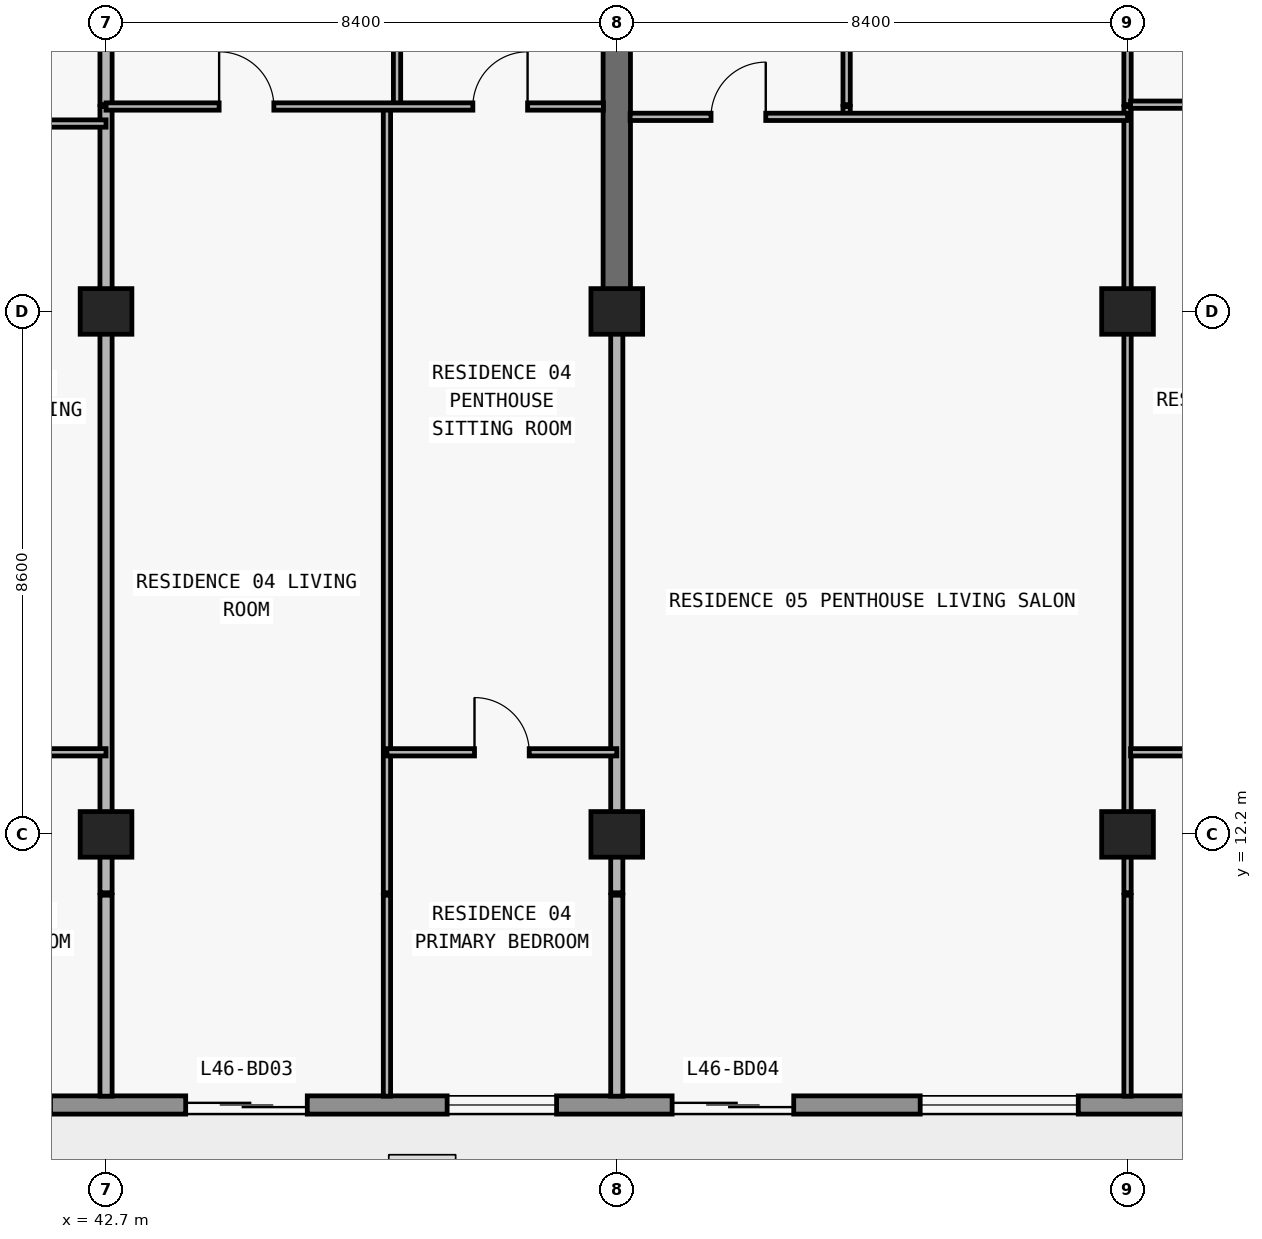
"""IFC4 building model, lengths in metres.
Left out: names, types, materials, properties, quantities, classifications, styles, units other than length and angle.
Written with IfcOpenShell. Run it as: python <this file> out.ifc"""

import sys

from ifc_helpers import new_model, si_unit, direction, frame, frame_2d, origin, origin_2d, place, context, subcontext, project, spatial, rectangle, extrude, element, fill, save


model = new_model("IFC4")
c1 = context("Model", 3, precision=1e-05, world=origin(), true_north=direction((0.0, 1.0)))
c2 = subcontext(c1, "Body", "Model", "MODEL_VIEW")
j1 = project(units=[si_unit("LENGTHUNIT", "METRE"), si_unit("PLANEANGLEUNIT", "RADIAN")], contexts=[c1])
p1 = place(None, origin())
s1 = spatial("IfcSite", under=j1, at=p1, CompositionType="ELEMENT")
p2 = place(p1, origin())
s2 = spatial("IfcBuilding", under=s1, at=p2, CompositionType="ELEMENT")
p3 = place(p2, frame((0.0, 0.0, 167.1)))
s3 = spatial("IfcBuildingStorey", under=s2, at=p3, CompositionType="ELEMENT", Elevation=167.1)
for number, where, z_axis, x_axis in (
    (1, (42.7, 12.2, 0.0), (0.0, 0.0, 1.0), (1.0, 0.0, 0.0)),
    (2, (51.1, 12.2, 0.0), (0.0, 0.0, 1.0), (1.0, 0.0, 0.0)),
    (3, (59.5, 12.2, 0.0), (0.0, 0.0, 1.0), (1.0, 0.0, 0.0)),
    (4, (42.7, 20.8, 0.0), (0.0, 0.0, 1.0), (1.0, 0.0, 0.0)),
    (5, (51.1, 20.8, 0.0), (0.0, 0.0, 1.0), (1.0, 0.0, 0.0)),
    (6, (59.5, 20.8, 0.0), (0.0, 0.0, 1.0), (1.0, 0.0, 0.0)),
):
    element("IfcColumn", number, at=place(p3, frame(where, z_axis=z_axis, x_axis=x_axis)), inside=s3, PredefinedType="COLUMN", context=c2, shape_type="SweptSolid", body=[
        extrude(rectangle(XDim=0.85, YDim=0.75, at=origin_2d()), origin(), (0.0, 0.0, 1.0), 3.05),
    ])
p4 = place(p3, frame((51.1, 20.8, 0.0), z_axis=(0.0, 0.0, 1.0), x_axis=(0.0, 1.0, 0.0)))
e7 = element("IfcWall", 7, at=p4, inside=s3, PredefinedType="SHEAR", context=c2, shape_type="SweptSolid", body=[
    extrude(rectangle(XDim=8.6, YDim=0.45, at=frame_2d((4.3, 0.0))), origin(), (0.0, 0.0, 1.0), 3.05),
])
p5 = place(p3, frame((67.7, 7.75, 0.0), z_axis=(0.0, 0.0, 1.0), x_axis=(-1.0, 0.0, 0.0)))
e8 = element("IfcWall", 8, at=p5, inside=s3, PredefinedType="STANDARD", context=c2, shape_type="SweptSolid", body=[
    extrude(rectangle(XDim=57.6, YDim=0.3, at=frame_2d((28.8, 0.0))), origin(), (0.0, 0.0, 1.0), 3.05),
])
p6 = place(p5, frame((54.69, 0.0, 0.0)))
e9 = element("IfcOpeningElement", 9, at=p6, cuts=e8, PredefinedType="OPENING", context=c2, shape_type="SweptSolid", body=[
    extrude(rectangle(XDim=2.0, YDim=2.3, at=frame_2d((1.0, 1.15))), frame((0.0, 0.16, 0.0), z_axis=(0.0, -1.0, 0.0), x_axis=(1.0, 0.0, 0.0)), (0.0, 0.0, 1.0), 0.32),
])
p7 = place(p5, frame((50.21, 0.0, 0.65)))
e10 = element("IfcOpeningElement", 10, at=p7, cuts=e8, PredefinedType="OPENING", context=c2, shape_type="SweptSolid", body=[
    extrude(rectangle(XDim=2.6, YDim=1.85, at=frame_2d((1.3, 0.925))), frame((0.0, 0.16, 0.0), z_axis=(0.0, -1.0, 0.0), x_axis=(1.0, 0.0, 0.0)), (0.0, 0.0, 1.0), 0.32),
])
p8 = place(p5, frame((44.1, 0.0, 0.85)))
e11 = element("IfcOpeningElement", 11, at=p8, cuts=e8, PredefinedType="OPENING", context=c2, shape_type="SweptSolid", body=[
    extrude(rectangle(XDim=2.2, YDim=1.55, at=frame_2d((1.1, 0.775))), frame((0.0, 0.16, 0.0), z_axis=(0.0, -1.0, 0.0), x_axis=(1.0, 0.0, 0.0)), (0.0, 0.0, 1.0), 0.32),
])
p9 = place(p5, frame((37.69, 0.0, 0.0)))
e12 = element("IfcOpeningElement", 12, at=p9, cuts=e8, PredefinedType="OPENING", context=c2, shape_type="SweptSolid", body=[
    extrude(rectangle(XDim=2.0, YDim=2.3, at=frame_2d((1.0, 1.15))), frame((0.0, 0.16, 0.0), z_axis=(0.0, -1.0, 0.0), x_axis=(1.0, 0.0, 0.0)), (0.0, 0.0, 1.0), 0.32),
])
p10 = place(p5, frame((33.59, 0.0, 0.85)))
e13 = element("IfcOpeningElement", 13, at=p10, cuts=e8, PredefinedType="OPENING", context=c2, shape_type="SweptSolid", body=[
    extrude(rectangle(XDim=1.8, YDim=1.55, at=frame_2d((0.9, 0.775))), frame((0.0, 0.16, 0.0), z_axis=(0.0, -1.0, 0.0), x_axis=(1.0, 0.0, 0.0)), (0.0, 0.0, 1.0), 0.32),
])
p11 = place(p5, frame((25.914, 0.0, 0.85)))
e14 = element("IfcOpeningElement", 14, at=p11, cuts=e8, PredefinedType="OPENING", context=c2, shape_type="SweptSolid", body=[
    extrude(rectangle(XDim=2.2, YDim=1.55, at=frame_2d((1.1, 0.775))), frame((0.0, 0.16, 0.0), z_axis=(0.0, -1.0, 0.0), x_axis=(1.0, 0.0, 0.0)), (0.0, 0.0, 1.0), 0.32),
])
p12 = place(p5, frame((21.69, 0.0, 0.0)))
e15 = element("IfcOpeningElement", 15, at=p12, cuts=e8, PredefinedType="OPENING", context=c2, shape_type="SweptSolid", body=[
    extrude(rectangle(XDim=2.0, YDim=2.3, at=frame_2d((1.0, 1.15))), frame((0.0, 0.16, 0.0), z_axis=(0.0, -1.0, 0.0), x_axis=(1.0, 0.0, 0.0)), (0.0, 0.0, 1.0), 0.32),
])
p13 = place(p5, frame((17.59, 0.0, 0.85)))
e16 = element("IfcOpeningElement", 16, at=p13, cuts=e8, PredefinedType="OPENING", context=c2, shape_type="SweptSolid", body=[
    extrude(rectangle(XDim=1.8, YDim=1.55, at=frame_2d((0.9, 0.775))), frame((0.0, 0.16, 0.0), z_axis=(0.0, -1.0, 0.0), x_axis=(1.0, 0.0, 0.0)), (0.0, 0.0, 1.0), 0.32),
])
p14 = place(p5, frame((13.69, 0.0, 0.0)))
e17 = element("IfcOpeningElement", 17, at=p14, cuts=e8, PredefinedType="OPENING", context=c2, shape_type="SweptSolid", body=[
    extrude(rectangle(XDim=2.0, YDim=2.3, at=frame_2d((1.0, 1.15))), frame((0.0, 0.16, 0.0), z_axis=(0.0, -1.0, 0.0), x_axis=(1.0, 0.0, 0.0)), (0.0, 0.0, 1.0), 0.32),
])
p15 = place(p5, frame((9.01, 0.0, 0.65)))
e18 = element("IfcOpeningElement", 18, at=p15, cuts=e8, PredefinedType="OPENING", context=c2, shape_type="SweptSolid", body=[
    extrude(rectangle(XDim=2.6, YDim=1.85, at=frame_2d((1.3, 0.925))), frame((0.0, 0.16, 0.0), z_axis=(0.0, -1.0, 0.0), x_axis=(1.0, 0.0, 0.0)), (0.0, 0.0, 1.0), 0.32),
])
p16 = place(p5, frame((3.0, 0.0, 0.85)))
e19 = element("IfcOpeningElement", 19, at=p16, cuts=e8, PredefinedType="OPENING", context=c2, shape_type="SweptSolid", body=[
    extrude(rectangle(XDim=2.2, YDim=1.55, at=frame_2d((1.1, 0.775))), frame((0.0, 0.16, 0.0), z_axis=(0.0, -1.0, 0.0), x_axis=(1.0, 0.0, 0.0)), (0.0, 0.0, 1.0), 0.32),
])
p17 = place(p3, frame((42.7, 7.895, 0.0), z_axis=(0.0, 0.0, 1.0), x_axis=(0.0, 1.0, 0.0)))
e20 = element("IfcWall", 20, at=p17, inside=s3, PredefinedType="PARTITIONING", context=c2, shape_type="SweptSolid", body=[
    extrude(rectangle(XDim=3.305, YDim=0.2, at=frame_2d((1.652, 0.0))), origin(), (0.0, 0.0, 1.0), 3.05),
])
p18 = place(p3, frame((42.7, 11.24, 0.0), z_axis=(0.0, 0.0, 1.0), x_axis=(0.0, 1.0, 0.0)))
e21 = element("IfcWall", 21, at=p18, inside=s3, PredefinedType="PARTITIONING", context=c2, shape_type="SweptSolid", body=[
    extrude(rectangle(XDim=12.93, YDim=0.2, at=frame_2d((6.465, 0.0))), origin(), (0.0, 0.0, 1.0), 2.263),
])
p19 = place(p3, frame((42.7, 24.2, 0.0), z_axis=(0.0, 0.0, 1.0), x_axis=(0.0, 1.0, 0.0)))
e22 = element("IfcWall", 22, at=p19, inside=s3, PredefinedType="PARTITIONING", context=c2, shape_type="SweptSolid", body=[
    extrude(rectangle(XDim=4.84, YDim=0.2, at=frame_2d((2.42, 0.0))), origin(), (0.0, 0.0, 1.0), 2.263),
])
p20 = place(p3, frame((47.32, 7.895, 0.0), z_axis=(0.0, 0.0, 1.0), x_axis=(0.0, 1.0, 0.0)))
e23 = element("IfcWall", 23, at=p20, inside=s3, PredefinedType="PARTITIONING", context=c2, shape_type="SweptSolid", body=[
    extrude(rectangle(XDim=3.305, YDim=0.12, at=frame_2d((1.652, 0.0))), origin(), (0.0, 0.0, 1.0), 3.05),
])
p21 = place(p3, frame((47.32, 11.24, 0.0), z_axis=(0.0, 0.0, 1.0), x_axis=(0.0, 1.0, 0.0)))
e24 = element("IfcWall", 24, at=p21, inside=s3, PredefinedType="PARTITIONING", context=c2, shape_type="SweptSolid", body=[
    extrude(rectangle(XDim=12.93, YDim=0.12, at=frame_2d((6.465, 0.0))), origin(), (0.0, 0.0, 1.0), 3.05),
])
p22 = place(p3, frame((47.486, 24.2, 0.0), z_axis=(0.0, 0.0, 1.0), x_axis=(0.0, 1.0, 0.0)))
e25 = element("IfcWall", 25, at=p22, inside=s3, PredefinedType="PARTITIONING", context=c2, shape_type="SweptSolid", body=[
    extrude(rectangle(XDim=4.84, YDim=0.12, at=frame_2d((2.42, 0.0))), origin(), (0.0, 0.0, 1.0), 3.05),
])
p23 = place(p22, frame((1.97, 0.0, 0.0)))
e26 = element("IfcOpeningElement", 26, at=p23, cuts=e25, PredefinedType="OPENING", context=c2, shape_type="SweptSolid", body=[
    extrude(rectangle(XDim=0.9, YDim=2.15, at=frame_2d((0.45, 1.075))), frame((0.0, 0.07, 0.0), z_axis=(0.0, -1.0, 0.0), x_axis=(1.0, 0.0, 0.0)), (0.0, 0.0, 1.0), 0.14),
])
p24 = place(p3, frame((51.1, 7.895, 0.0), z_axis=(0.0, 0.0, 1.0), x_axis=(0.0, 1.0, 0.0)))
e27 = element("IfcWall", 27, at=p24, inside=s3, PredefinedType="PARTITIONING", context=c2, shape_type="SweptSolid", body=[
    extrude(rectangle(XDim=3.305, YDim=0.2, at=frame_2d((1.652, 0.0))), origin(), (0.0, 0.0, 1.0), 3.05),
])
p25 = place(p3, frame((51.1, 11.24, 0.0), z_axis=(0.0, 0.0, 1.0), x_axis=(0.0, 1.0, 0.0)))
e28 = element("IfcWall", 28, at=p25, inside=s3, PredefinedType="PARTITIONING", context=c2, shape_type="SweptSolid", body=[
    extrude(rectangle(XDim=9.555, YDim=0.2, at=frame_2d((4.777, 0.0))), origin(), (0.0, 0.0, 1.0), 2.263),
])
p26 = place(p3, frame((54.88, 24.0, 0.0), z_axis=(0.0, 0.0, 1.0), x_axis=(0.0, 1.0, 0.0)))
e29 = element("IfcWall", 29, at=p26, inside=s3, PredefinedType="PARTITIONING", context=c2, shape_type="SweptSolid", body=[
    extrude(rectangle(XDim=0.17, YDim=0.12, at=frame_2d((0.085, 0.0))), origin(), (0.0, 0.0, 1.0), 3.05),
])
p27 = place(p3, frame((54.88, 24.2, 0.0), z_axis=(0.0, 0.0, 1.0), x_axis=(0.0, 1.0, 0.0)))
e30 = element("IfcWall", 30, at=p27, inside=s3, PredefinedType="PARTITIONING", context=c2, shape_type="SweptSolid", body=[
    extrude(rectangle(XDim=4.6, YDim=0.12, at=frame_2d((2.3, 0.0))), origin(), (0.0, 0.0, 1.0), 3.05),
])
p28 = place(p27, frame((1.85, 0.0, 0.0)))
e31 = element("IfcOpeningElement", 31, at=p28, cuts=e30, PredefinedType="OPENING", context=c2, shape_type="SweptSolid", body=[
    extrude(rectangle(XDim=0.9, YDim=2.15, at=frame_2d((0.45, 1.075))), frame((0.0, 0.07, 0.0), z_axis=(0.0, -1.0, 0.0), x_axis=(1.0, 0.0, 0.0)), (0.0, 0.0, 1.0), 0.14),
])
p29 = place(p3, frame((59.5, 7.895, 0.0), z_axis=(0.0, 0.0, 1.0), x_axis=(0.0, 1.0, 0.0)))
e32 = element("IfcWall", 32, at=p29, inside=s3, PredefinedType="PARTITIONING", context=c2, shape_type="SweptSolid", body=[
    extrude(rectangle(XDim=3.305, YDim=0.12, at=frame_2d((1.652, 0.0))), origin(), (0.0, 0.0, 1.0), 3.05),
])
p30 = place(p3, frame((59.5, 11.24, 0.0), z_axis=(0.0, 0.0, 1.0), x_axis=(0.0, 1.0, 0.0)))
e33 = element("IfcWall", 33, at=p30, inside=s3, PredefinedType="PARTITIONING", context=c2, shape_type="SweptSolid", body=[
    extrude(rectangle(XDim=12.93, YDim=0.12, at=frame_2d((6.465, 0.0))), origin(), (0.0, 0.0, 1.0), 2.263),
])
p31 = place(p3, frame((59.5, 24.2, 0.0), z_axis=(0.0, 0.0, 1.0), x_axis=(0.0, 1.0, 0.0)))
e34 = element("IfcWall", 34, at=p31, inside=s3, PredefinedType="PARTITIONING", context=c2, shape_type="SweptSolid", body=[
    extrude(rectangle(XDim=4.84, YDim=0.12, at=frame_2d((2.42, 0.0))), origin(), (0.0, 0.0, 1.0), 2.263),
])
p32 = place(p31, frame((1.75, 0.0, 0.0)))
e35 = element("IfcOpeningElement", 35, at=p32, cuts=e34, PredefinedType="OPENING", context=c2, shape_type="SweptSolid", body=[
    extrude(rectangle(XDim=0.9, YDim=2.15, at=frame_2d((0.45, 1.075))), frame((0.0, 0.07, 0.0), z_axis=(0.0, -1.0, 0.0), x_axis=(1.0, 0.0, 0.0)), (0.0, 0.0, 1.0), 0.14),
])
p33 = place(p3, frame((38.672, 13.55, 0.0), z_axis=(0.0, 0.0, 1.0), x_axis=(1.0, 0.0, 0.0)))
e36 = element("IfcWall", 36, at=p33, inside=s3, PredefinedType="PARTITIONING", context=c2, shape_type="SweptSolid", body=[
    extrude(rectangle(XDim=4.028, YDim=0.12, at=frame_2d((2.014, 0.0))), origin(), (0.0, 0.0, 1.0), 3.05),
])
p34 = place(p33, frame((1.564, 0.0, 0.0)))
e37 = element("IfcOpeningElement", 37, at=p34, cuts=e36, PredefinedType="OPENING", context=c2, shape_type="SweptSolid", body=[
    extrude(rectangle(XDim=0.9, YDim=2.15, at=frame_2d((0.45, 1.075))), frame((0.0, 0.07, 0.0), z_axis=(0.0, -1.0, 0.0), x_axis=(1.0, 0.0, 0.0)), (0.0, 0.0, 1.0), 0.14),
])
p35 = place(p3, frame((47.32, 13.55, 0.0), z_axis=(0.0, 0.0, 1.0), x_axis=(1.0, 0.0, 0.0)))
e38 = element("IfcWall", 38, at=p35, inside=s3, PredefinedType="PARTITIONING", context=c2, shape_type="SweptSolid", body=[
    extrude(rectangle(XDim=3.78, YDim=0.12, at=frame_2d((1.89, 0.0))), origin(), (0.0, 0.0, 1.0), 3.05),
])
p36 = place(p35, frame((1.44, 0.0, 0.0)))
e39 = element("IfcOpeningElement", 39, at=p36, cuts=e38, PredefinedType="OPENING", context=c2, shape_type="SweptSolid", body=[
    extrude(rectangle(XDim=0.9, YDim=2.15, at=frame_2d((0.45, 1.075))), frame((0.0, 0.07, 0.0), z_axis=(0.0, -1.0, 0.0), x_axis=(1.0, 0.0, 0.0)), (0.0, 0.0, 1.0), 0.14),
])
p37 = place(p3, frame((59.55, 13.55, 0.0), z_axis=(0.0, 0.0, 1.0), x_axis=(1.0, 0.0, 0.0)))
e40 = element("IfcWall", 40, at=p37, inside=s3, PredefinedType="PARTITIONING", context=c2, shape_type="SweptSolid", body=[
    extrude(rectangle(XDim=8.15, YDim=0.12, at=frame_2d((4.075, 0.0))), origin(), (0.0, 0.0, 1.0), 3.05),
])
p38 = place(p37, frame((3.625, 0.0, 0.0)))
e41 = element("IfcOpeningElement", 41, at=p38, cuts=e40, PredefinedType="OPENING", context=c2, shape_type="SweptSolid", body=[
    extrude(rectangle(XDim=0.9, YDim=2.15, at=frame_2d((0.45, 1.075))), frame((0.0, 0.07, 0.0), z_axis=(0.0, -1.0, 0.0), x_axis=(1.0, 0.0, 0.0)), (0.0, 0.0, 1.0), 0.14),
])
p39 = place(p3, frame((35.1, 23.89, 0.0), z_axis=(0.0, 0.0, 1.0), x_axis=(1.0, 0.0, 0.0)))
e42 = element("IfcWall", 42, at=p39, inside=s3, PredefinedType="PARTITIONING", context=c2, shape_type="SweptSolid", body=[
    extrude(rectangle(XDim=7.6, YDim=0.12, at=frame_2d((3.8, 0.0))), origin(), (0.0, 0.0, 1.0), 3.05),
])
p40 = place(p39, frame((1.336, 0.0, 0.0)))
e43 = element("IfcOpeningElement", 43, at=p40, cuts=e42, PredefinedType="OPENING", context=c2, shape_type="SweptSolid", body=[
    extrude(rectangle(XDim=0.9, YDim=2.15, at=frame_2d((0.45, 1.075))), frame((0.0, 0.07, 0.0), z_axis=(0.0, -1.0, 0.0), x_axis=(1.0, 0.0, 0.0)), (0.0, 0.0, 1.0), 0.14),
])
p41 = place(p39, frame((5.402, 0.0, 0.0)))
e44 = element("IfcOpeningElement", 44, at=p41, cuts=e42, PredefinedType="OPENING", context=c2, shape_type="SweptSolid", body=[
    extrude(rectangle(XDim=0.9, YDim=2.15, at=frame_2d((0.45, 1.075))), frame((0.0, 0.07, 0.0), z_axis=(0.0, -1.0, 0.0), x_axis=(1.0, 0.0, 0.0)), (0.0, 0.0, 1.0), 0.14),
])
p42 = place(p3, frame((51.32, 24.0, 0.0), z_axis=(0.0, 0.0, 1.0), x_axis=(1.0, 0.0, 0.0)))
e45 = element("IfcWall", 45, at=p42, inside=s3, PredefinedType="PARTITIONING", context=c2, shape_type="SweptSolid", body=[
    extrude(rectangle(XDim=8.18, YDim=0.12, at=frame_2d((4.09, 0.0))), origin(), (0.0, 0.0, 1.0), 3.05),
])
p43 = place(p42, frame((1.33, 0.0, 0.0)))
e46 = element("IfcOpeningElement", 46, at=p43, cuts=e45, PredefinedType="OPENING", context=c2, shape_type="SweptSolid", body=[
    extrude(rectangle(XDim=0.9, YDim=2.15, at=frame_2d((0.45, 1.075))), frame((0.0, 0.07, 0.0), z_axis=(0.0, -1.0, 0.0), x_axis=(1.0, 0.0, 0.0)), (0.0, 0.0, 1.0), 0.14),
])
p44 = place(p3, frame((42.7, 24.17, 0.0), z_axis=(0.0, 0.0, 1.0), x_axis=(1.0, 0.0, 0.0)))
e47 = element("IfcWall", 47, at=p44, inside=s3, PredefinedType="PARTITIONING", context=c2, shape_type="SweptSolid", body=[
    extrude(rectangle(XDim=8.18, YDim=0.12, at=frame_2d((4.09, 0.0))), origin(), (0.0, 0.0, 1.0), 3.05),
])
p45 = place(p44, frame((1.86, 0.0, 0.0)))
e48 = element("IfcOpeningElement", 48, at=p45, cuts=e47, PredefinedType="OPENING", context=c2, shape_type="SweptSolid", body=[
    extrude(rectangle(XDim=0.9, YDim=2.15, at=frame_2d((0.45, 1.075))), frame((0.0, 0.07, 0.0), z_axis=(0.0, -1.0, 0.0), x_axis=(1.0, 0.0, 0.0)), (0.0, 0.0, 1.0), 0.14),
])
p46 = place(p44, frame((6.033, 0.0, 0.0)))
e49 = element("IfcOpeningElement", 49, at=p46, cuts=e47, PredefinedType="OPENING", context=c2, shape_type="SweptSolid", body=[
    extrude(rectangle(XDim=0.9, YDim=2.15, at=frame_2d((0.45, 1.075))), frame((0.0, 0.07, 0.0), z_axis=(0.0, -1.0, 0.0), x_axis=(1.0, 0.0, 0.0)), (0.0, 0.0, 1.0), 0.14),
])
p47 = place(p3, frame((59.55, 24.2, 0.0), z_axis=(0.0, 0.0, 1.0), x_axis=(1.0, 0.0, 0.0)))
e50 = element("IfcWall", 50, at=p47, inside=s3, PredefinedType="PARTITIONING", context=c2, shape_type="SweptSolid", body=[
    extrude(rectangle(XDim=8.15, YDim=0.12, at=frame_2d((4.075, 0.0))), origin(), (0.0, 0.0, 1.0), 3.05),
])
p48 = place(p47, frame((3.625, 0.0, 0.0)))
e51 = element("IfcOpeningElement", 51, at=p48, cuts=e50, PredefinedType="OPENING", context=c2, shape_type="SweptSolid", body=[
    extrude(rectangle(XDim=0.9, YDim=2.15, at=frame_2d((0.45, 1.075))), frame((0.0, 0.07, 0.0), z_axis=(0.0, -1.0, 0.0), x_axis=(1.0, 0.0, 0.0)), (0.0, 0.0, 1.0), 0.14),
])
p49 = place(p12, origin())
e52 = element("IfcDoor", 52, at=p49, inside=s3, OperationType="DOUBLE_DOOR_SLIDING", PredefinedType="DOOR", context=c2, shape_type="SweptSolid", body=[
    extrude(rectangle(XDim=2.0, YDim=2.3, at=frame_2d((1.0, 1.15))), frame((0.0, 0.025, 0.0), z_axis=(0.0, -1.0, 0.0), x_axis=(1.0, 0.0, 0.0)), (0.0, 0.0, 1.0), 0.05),
])
fill(e15, e52)
p50 = place(p13, origin())
e53 = element("IfcWindow", 53, at=p50, inside=s3, PartitioningType="SINGLE_PANEL", PredefinedType="WINDOW", context=c2, shape_type="SweptSolid", body=[
    extrude(rectangle(XDim=1.8, YDim=1.55, at=frame_2d((0.9, 0.775))), frame((0.0, 0.03, 0.0), z_axis=(0.0, -1.0, 0.0), x_axis=(1.0, 0.0, 0.0)), (0.0, 0.0, 1.0), 0.06),
])
fill(e16, e53)
p51 = place(p14, origin())
e54 = element("IfcDoor", 54, at=p51, inside=s3, OperationType="DOUBLE_DOOR_SLIDING", PredefinedType="DOOR", context=c2, shape_type="SweptSolid", body=[
    extrude(rectangle(XDim=2.0, YDim=2.3, at=frame_2d((1.0, 1.15))), frame((0.0, 0.025, 0.0), z_axis=(0.0, -1.0, 0.0), x_axis=(1.0, 0.0, 0.0)), (0.0, 0.0, 1.0), 0.05),
])
fill(e17, e54)
p52 = place(p15, origin())
e55 = element("IfcWindow", 55, at=p52, inside=s3, PartitioningType="SINGLE_PANEL", PredefinedType="WINDOW", context=c2, shape_type="SweptSolid", body=[
    extrude(rectangle(XDim=2.6, YDim=1.85, at=frame_2d((1.3, 0.925))), frame((0.0, 0.03, 0.0), z_axis=(0.0, -1.0, 0.0), x_axis=(1.0, 0.0, 0.0)), (0.0, 0.0, 1.0), 0.06),
])
fill(e18, e55)
p53 = place(p45, origin())
e56 = element("IfcDoor", 56, at=p53, inside=s3, OperationType="SINGLE_SWING_LEFT", PredefinedType="DOOR", context=c2, shape_type="SweptSolid", body=[
    extrude(rectangle(XDim=0.9, YDim=2.15, at=frame_2d((0.45, 1.075))), frame((0.0, 0.025, 0.0), z_axis=(0.0, -1.0, 0.0), x_axis=(1.0, 0.0, 0.0)), (0.0, 0.0, 1.0), 0.05),
])
fill(e48, e56)
p54 = place(p46, origin())
e57 = element("IfcDoor", 57, at=p54, inside=s3, OperationType="SINGLE_SWING_RIGHT", PredefinedType="DOOR", context=c2, shape_type="SweptSolid", body=[
    extrude(rectangle(XDim=0.9, YDim=2.15, at=frame_2d((0.45, 1.075))), frame((0.0, 0.025, 0.0), z_axis=(0.0, -1.0, 0.0), x_axis=(1.0, 0.0, 0.0)), (0.0, 0.0, 1.0), 0.05),
])
fill(e49, e57)
p55 = place(p36, origin())
e58 = element("IfcDoor", 58, at=p55, inside=s3, OperationType="SINGLE_SWING_LEFT", PredefinedType="DOOR", context=c2, shape_type="SweptSolid", body=[
    extrude(rectangle(XDim=0.9, YDim=2.15, at=frame_2d((0.45, 1.075))), frame((0.0, 0.025, 0.0), z_axis=(0.0, -1.0, 0.0), x_axis=(1.0, 0.0, 0.0)), (0.0, 0.0, 1.0), 0.05),
])
fill(e39, e58)
p56 = place(p43, origin())
e59 = element("IfcDoor", 59, at=p56, inside=s3, OperationType="SINGLE_SWING_RIGHT", PredefinedType="DOOR", context=c2, shape_type="SweptSolid", body=[
    extrude(rectangle(XDim=0.9, YDim=2.15, at=frame_2d((0.45, 1.075))), frame((0.0, 0.025, 0.0), z_axis=(0.0, -1.0, 0.0), x_axis=(1.0, 0.0, 0.0)), (0.0, 0.0, 1.0), 0.05),
])
fill(e46, e59)
save(model, sys.argv[1])
